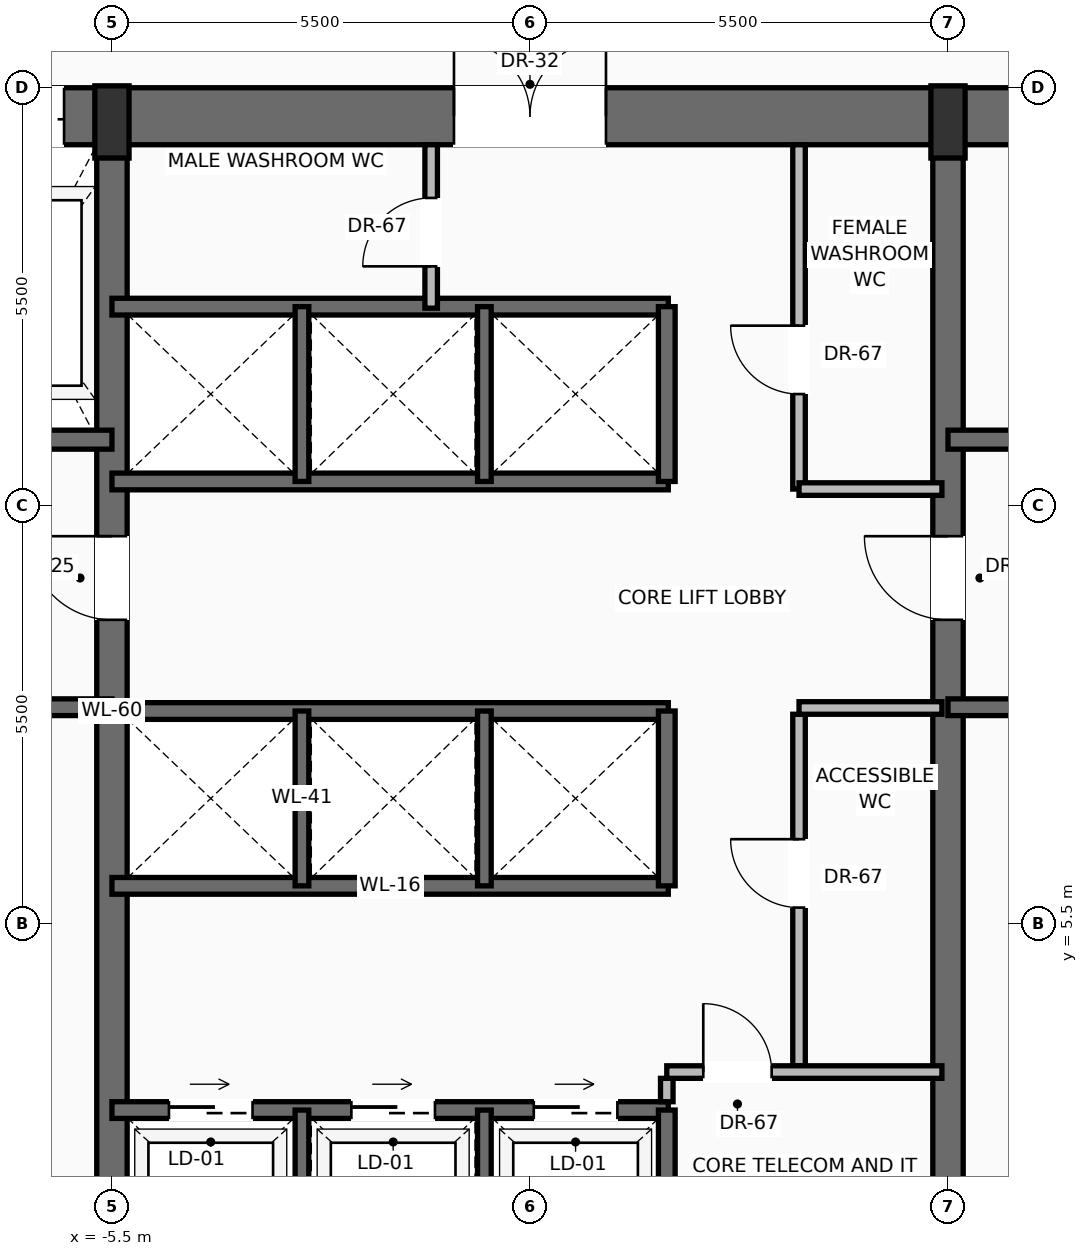
"""IFC4 building model, lengths in metres.
Left out: names, types, materials, properties, quantities, classifications, styles, units other than length and angle.
Written with IfcOpenShell. Run it as: python <this file> out.ifc"""

import sys

from ifc_helpers import new_model, si_unit, direction, frame, frame_2d, origin, origin_2d, place, context, subcontext, project, spatial, rectangle, extrude, source, transform, mapped, element, fill, save


model = new_model("IFC4")
c1 = context("Model", 3, precision=1e-05, world=origin(), true_north=direction((0.0, 1.0)))
c2 = subcontext(c1, "Body", "Model", "MODEL_VIEW")
j1 = project(units=[si_unit("LENGTHUNIT", "METRE"), si_unit("PLANEANGLEUNIT", "RADIAN")], contexts=[c1])
p1 = place(None, origin())
s1 = spatial("IfcSite", under=j1, at=p1, CompositionType="ELEMENT")
p2 = place(p1, origin())
s2 = spatial("IfcBuilding", under=s1, at=p2, CompositionType="ELEMENT")
p3 = place(p2, frame((0.0, 0.0, 91.4)))
s3 = spatial("IfcBuildingStorey", under=s2, at=p3, CompositionType="ELEMENT", Elevation=91.4)
p4 = place(p3, frame((-10.9, 16.125, 0.0), z_axis=(0.0, 0.0, 1.0), x_axis=(1.0, 0.0, 0.0)))
e1 = element("IfcWall", 1, at=p4, inside=s3, PredefinedType="SHEAR", context=c2, shape_type="SweptSolid", body=[
    extrude(rectangle(XDim=21.8, YDim=0.75, at=frame_2d((10.9, 0.0))), origin(), (0.0, 0.0, 1.0), 3.45),
])
p5 = place(p4, frame((3.47, 0.0, 0.0)))
e2 = element("IfcOpeningElement", 2, at=p5, cuts=e1, PredefinedType="OPENING", context=c2, shape_type="SweptSolid", body=[
    extrude(rectangle(XDim=1.3, YDim=2.3, at=frame_2d((0.65, 1.15))), frame((0.0, 0.385, 0.0), z_axis=(0.0, -1.0, 0.0), x_axis=(1.0, 0.0, 0.0)), (0.0, 0.0, 1.0), 0.77),
])
p6 = place(p4, frame((9.9, 0.0, 0.0)))
e3 = element("IfcOpeningElement", 3, at=p6, cuts=e1, PredefinedType="OPENING", context=c2, shape_type="SweptSolid", body=[
    extrude(rectangle(XDim=2.0, YDim=2.4, at=frame_2d((1.0, 1.2))), frame((0.0, 0.385, 0.0), z_axis=(0.0, -1.0, 0.0), x_axis=(1.0, 0.0, 0.0)), (0.0, 0.0, 1.0), 0.77),
])
p7 = place(p3, frame((-5.5, 0.475, 0.0), z_axis=(0.0, 0.0, 1.0), x_axis=(0.0, 1.0, 0.0)))
e4 = element("IfcWall", 4, at=p7, inside=s3, PredefinedType="SHEAR", context=c2, shape_type="SweptSolid", body=[
    extrude(rectangle(XDim=15.65, YDim=0.4, at=frame_2d((7.825, 0.0))), origin(), (0.0, 0.0, 1.0), 3.45),
])
p8 = place(p7, frame((9.025, 0.0, 0.0)))
e5 = element("IfcOpeningElement", 5, at=p8, cuts=e4, PredefinedType="OPENING", context=c2, shape_type="SweptSolid", body=[
    extrude(rectangle(XDim=1.1, YDim=2.2, at=frame_2d((0.55, 1.1))), frame((0.0, 0.21, 0.0), z_axis=(0.0, -1.0, 0.0), x_axis=(1.0, 0.0, 0.0)), (0.0, 0.0, 1.0), 0.42),
])
p9 = place(p3, frame((5.5, 0.475, 0.0), z_axis=(0.0, 0.0, 1.0), x_axis=(0.0, 1.0, 0.0)))
e6 = element("IfcWall", 6, at=p9, inside=s3, PredefinedType="SHEAR", context=c2, shape_type="SweptSolid", body=[
    extrude(rectangle(XDim=15.65, YDim=0.4, at=frame_2d((7.825, 0.0))), origin(), (0.0, 0.0, 1.0), 3.45),
])
p10 = place(p9, frame((9.025, 0.0, 0.0)))
e7 = element("IfcOpeningElement", 7, at=p10, cuts=e6, PredefinedType="OPENING", context=c2, shape_type="SweptSolid", body=[
    extrude(rectangle(XDim=1.1, YDim=2.2, at=frame_2d((0.55, 1.1))), frame((0.0, 0.21, 0.0), z_axis=(0.0, -1.0, 0.0), x_axis=(1.0, 0.0, 0.0)), (0.0, 0.0, 1.0), 0.42),
])
m1 = source(origin(), c2, "Body", "SweptSolid", [
    extrude(rectangle(XDim=0.45, YDim=0.95, at=origin_2d()), origin(), (0.0, 0.0, 1.0), 3.7),
])
for number, where, z_axis, x_axis in (
    (8, (-5.5, 16.05, 0.0), (0.0, 0.0, 1.0), (1.0, 0.0, 0.0)),
    (9, (5.5, 16.05, 0.0), (0.0, 0.0, 1.0), (1.0, 0.0, 0.0)),
):
    element("IfcColumn", number, at=place(p3, frame(where, z_axis=z_axis, x_axis=x_axis)), inside=s3, PredefinedType="PILASTER", context=c2, shape_type="MappedRepresentation", body=[
        mapped(m1, transform((0.0, 0.0, 0.0), scale=1.0)),
    ])
p11 = place(p3, frame((-5.5, 8.35, 0.0), z_axis=(0.0, 0.0, 1.0), x_axis=(-1.0, 0.0, 0.0)))
e10 = element("IfcWall", 10, at=p11, inside=s3, PredefinedType="SOLIDWALL", context=c2, shape_type="SweptSolid", body=[
    extrude(rectangle(XDim=4.65, YDim=0.22, at=frame_2d((2.325, 0.0))), origin(), (0.0, 0.0, 1.0), 3.45),
])
p12 = place(p11, frame((2.5, 0.0, 0.0)))
e11 = element("IfcOpeningElement", 11, at=p12, cuts=e10, PredefinedType="OPENING", context=c2, shape_type="SweptSolid", body=[
    extrude(rectangle(XDim=1.15, YDim=2.2, at=frame_2d((0.575, 1.1))), frame((0.0, 0.12, 0.0), z_axis=(0.0, -1.0, 0.0), x_axis=(1.0, 0.0, 0.0)), (0.0, 0.0, 1.0), 0.24),
])
p13 = place(p3, frame((-5.5, 11.87, 0.0), z_axis=(0.0, 0.0, 1.0), x_axis=(-1.0, 0.0, 0.0)))
e12 = element("IfcWall", 12, at=p13, inside=s3, PredefinedType="SOLIDWALL", context=c2, shape_type="SweptSolid", body=[
    extrude(rectangle(XDim=4.65, YDim=0.25, at=frame_2d((2.325, 0.0))), origin(), (0.0, 0.0, 1.0), 3.45),
])
p14 = place(p13, frame((2.95, 0.0, 0.0)))
e13 = element("IfcOpeningElement", 13, at=p14, cuts=e12, PredefinedType="OPENING", context=c2, shape_type="SweptSolid", body=[
    extrude(rectangle(XDim=1.2, YDim=2.25, at=frame_2d((0.6, 1.125))), frame((0.0, 0.135, 0.0), z_axis=(0.0, -1.0, 0.0), x_axis=(1.0, 0.0, 0.0)), (0.0, 0.0, 1.0), 0.27),
])
p15 = place(p3, frame((10.15, 8.35, 0.0), z_axis=(0.0, 0.0, 1.0), x_axis=(-1.0, 0.0, 0.0)))
e14 = element("IfcWall", 14, at=p15, inside=s3, PredefinedType="SOLIDWALL", context=c2, shape_type="SweptSolid", body=[
    extrude(rectangle(XDim=4.65, YDim=0.22, at=frame_2d((2.325, 0.0))), origin(), (0.0, 0.0, 1.0), 3.45),
])
p16 = place(p15, frame((1.0, 0.0, 0.0)))
e15 = element("IfcOpeningElement", 15, at=p16, cuts=e14, PredefinedType="OPENING", context=c2, shape_type="SweptSolid", body=[
    extrude(rectangle(XDim=1.15, YDim=2.2, at=frame_2d((0.575, 1.1))), frame((0.0, 0.12, 0.0), z_axis=(0.0, -1.0, 0.0), x_axis=(1.0, 0.0, 0.0)), (0.0, 0.0, 1.0), 0.24),
])
p17 = place(p3, frame((10.15, 11.87, 0.0), z_axis=(0.0, 0.0, 1.0), x_axis=(-1.0, 0.0, 0.0)))
e16 = element("IfcWall", 16, at=p17, inside=s3, PredefinedType="SOLIDWALL", context=c2, shape_type="SweptSolid", body=[
    extrude(rectangle(XDim=4.65, YDim=0.25, at=frame_2d((2.325, 0.0))), origin(), (0.0, 0.0, 1.0), 3.45),
])
p18 = place(p17, frame((0.5, 0.0, 0.0)))
e17 = element("IfcOpeningElement", 17, at=p18, cuts=e16, PredefinedType="OPENING", context=c2, shape_type="SweptSolid", body=[
    extrude(rectangle(XDim=1.2, YDim=2.25, at=frame_2d((0.6, 1.125))), frame((0.0, 0.135, 0.0), z_axis=(0.0, -1.0, 0.0), x_axis=(1.0, 0.0, 0.0)), (0.0, 0.0, 1.0), 0.27),
])
p19 = place(p3, frame((-5.5, 3.05, 0.0), z_axis=(0.0, 0.0, 1.0), x_axis=(1.0, 0.0, 0.0)))
e18 = element("IfcWall", 18, at=p19, inside=s3, PredefinedType="SOLIDWALL", context=c2, shape_type="SweptSolid", body=[
    extrude(rectangle(XDim=7.32, YDim=0.22, at=frame_2d((3.66, 0.0))), origin(), (0.0, 0.0, 1.0), 3.45),
])
p20 = place(p19, frame((0.75, 0.0, 0.0)))
e19 = element("IfcOpeningElement", 19, at=p20, cuts=e18, PredefinedType="OPENING", context=c2, shape_type="SweptSolid", body=[
    extrude(rectangle(XDim=1.1, YDim=2.2, at=frame_2d((0.55, 1.1))), frame((0.0, 0.12, 0.0), z_axis=(0.0, -1.0, 0.0), x_axis=(1.0, 0.0, 0.0)), (0.0, 0.0, 1.0), 0.24),
])
p21 = place(p19, frame((3.15, 0.0, 0.0)))
e20 = element("IfcOpeningElement", 20, at=p21, cuts=e18, PredefinedType="OPENING", context=c2, shape_type="SweptSolid", body=[
    extrude(rectangle(XDim=1.1, YDim=2.2, at=frame_2d((0.55, 1.1))), frame((0.0, 0.12, 0.0), z_axis=(0.0, -1.0, 0.0), x_axis=(1.0, 0.0, 0.0)), (0.0, 0.0, 1.0), 0.24),
])
p22 = place(p19, frame((5.55, 0.0, 0.0)))
e21 = element("IfcOpeningElement", 21, at=p22, cuts=e18, PredefinedType="OPENING", context=c2, shape_type="SweptSolid", body=[
    extrude(rectangle(XDim=1.1, YDim=2.2, at=frame_2d((0.55, 1.1))), frame((0.0, 0.12, 0.0), z_axis=(0.0, -1.0, 0.0), x_axis=(1.0, 0.0, 0.0)), (0.0, 0.0, 1.0), 0.24),
])
p23 = place(p3, frame((1.8, 0.85, 0.0), z_axis=(0.0, 0.0, 1.0), x_axis=(0.0, 1.0, 0.0)))
e22 = element("IfcWall", 22, at=p23, inside=s3, PredefinedType="SOLIDWALL", context=c2, shape_type="SweptSolid", body=[
    extrude(rectangle(XDim=2.2, YDim=0.22, at=frame_2d((1.1, 0.0))), origin(), (0.0, 0.0, 1.0), 3.45),
])
for number, where, z_axis, x_axis in (
    (23, (-3.0, 0.85, 0.0), (0.0, 0.0, 1.0), (0.0, 1.0, 0.0)),
    (24, (-0.6, 0.85, 0.0), (0.0, 0.0, 1.0), (0.0, 1.0, 0.0)),
):
    element("IfcWall", number, at=place(p3, frame(where, z_axis=z_axis, x_axis=x_axis)), inside=s3, PredefinedType="SOLIDWALL", context=c2, shape_type="SweptSolid", body=[
        extrude(rectangle(XDim=2.2, YDim=0.18, at=frame_2d((1.1, 0.0))), origin(), (0.0, 0.0, 1.0), 3.45),
    ])
p24 = place(p3, frame((1.8, 3.16, 0.0), z_axis=(0.0, 0.0, 1.0), x_axis=(0.0, 1.0, 0.0)))
e25 = element("IfcWall", 25, at=p24, inside=s3, PredefinedType="PARTITIONING", context=c2, shape_type="SweptSolid", body=[
    extrude(rectangle(XDim=0.308, YDim=0.165, at=frame_2d((0.154, 0.0))), origin(), (0.0, 0.0, 1.0), 3.442),
])
p25 = place(p3, frame((3.54, 3.633, 0.0), z_axis=(0.0, 0.0, 1.0), x_axis=(0.0, 1.0, 0.0)))
e26 = element("IfcWall", 26, at=p25, inside=s3, PredefinedType="PARTITIONING", context=c2, shape_type="SweptSolid", body=[
    extrude(rectangle(XDim=4.625, YDim=0.165, at=frame_2d((2.312, 0.0))), origin(), (0.0, 0.0, 1.0), 3.442),
])
p26 = place(p25, frame((2.081, 0.0, 0.0)))
e27 = element("IfcOpeningElement", 27, at=p26, cuts=e26, PredefinedType="OPENING", context=c2, shape_type="SweptSolid", body=[
    extrude(rectangle(XDim=0.9, YDim=2.1, at=frame_2d((0.45, 1.05))), frame((0.0, 0.093, 0.0), z_axis=(0.0, -1.0, 0.0), x_axis=(1.0, 0.0, 0.0)), (0.0, 0.0, 1.0), 0.185),
])
p27 = place(p3, frame((3.54, 8.34, 0.0), z_axis=(0.0, 0.0, 1.0), x_axis=(1.0, 0.0, 0.0)))
e28 = element("IfcWall", 28, at=p27, inside=s3, PredefinedType="PARTITIONING", context=c2, shape_type="SweptSolid", body=[
    extrude(rectangle(XDim=1.88, YDim=0.165, at=frame_2d((0.94, 0.0))), origin(), (0.0, 0.0, 1.0), 3.442),
])
p28 = place(p3, frame((1.8, 3.55, 0.0), z_axis=(0.0, 0.0, 1.0), x_axis=(1.0, 0.0, 0.0)))
e29 = element("IfcWall", 29, at=p28, inside=s3, PredefinedType="PARTITIONING", context=c2, shape_type="SweptSolid", body=[
    extrude(rectangle(XDim=3.62, YDim=0.165, at=frame_2d((1.81, 0.0))), origin(), (0.0, 0.0, 1.0), 3.442),
])
p29 = place(p28, frame((0.48, 0.0, 0.0)))
e30 = element("IfcOpeningElement", 30, at=p29, cuts=e29, PredefinedType="OPENING", context=c2, shape_type="SweptSolid", body=[
    extrude(rectangle(XDim=0.9, YDim=2.1, at=frame_2d((0.45, 1.05))), frame((0.0, 0.093, 0.0), z_axis=(0.0, -1.0, 0.0), x_axis=(1.0, 0.0, 0.0)), (0.0, 0.0, 1.0), 0.185),
])
for number, where, z_axis, x_axis in (
    (31, (-5.5, 6.0, 0.0), (0.0, 0.0, 1.0), (1.0, 0.0, 0.0)),
    (32, (-5.5, 8.3, 0.0), (0.0, 0.0, 1.0), (1.0, 0.0, 0.0)),
):
    element("IfcWall", number, at=place(p3, frame(where, z_axis=z_axis, x_axis=x_axis)), inside=s3, PredefinedType="SOLIDWALL", context=c2, shape_type="SweptSolid", body=[
        extrude(rectangle(XDim=7.32, YDim=0.22, at=frame_2d((3.66, 0.0))), origin(), (0.0, 0.0, 1.0), 3.45),
    ])
p30 = place(p3, frame((1.8, 6.0, 0.0), z_axis=(0.0, 0.0, 1.0), x_axis=(0.0, 1.0, 0.0)))
e33 = element("IfcWall", 33, at=p30, inside=s3, PredefinedType="SOLIDWALL", context=c2, shape_type="SweptSolid", body=[
    extrude(rectangle(XDim=2.3, YDim=0.22, at=frame_2d((1.15, 0.0))), origin(), (0.0, 0.0, 1.0), 3.45),
])
for number, where, z_axis, x_axis in (
    (34, (-3.0, 6.0, 0.0), (0.0, 0.0, 1.0), (0.0, 1.0, 0.0)),
    (35, (-0.6, 6.0, 0.0), (0.0, 0.0, 1.0), (0.0, 1.0, 0.0)),
):
    element("IfcWall", number, at=place(p3, frame(where, z_axis=z_axis, x_axis=x_axis)), inside=s3, PredefinedType="SOLIDWALL", context=c2, shape_type="SweptSolid", body=[
        extrude(rectangle(XDim=2.3, YDim=0.18, at=frame_2d((1.15, 0.0))), origin(), (0.0, 0.0, 1.0), 3.45),
    ])
for number, where, z_axis, x_axis in (
    (36, (-5.5, 11.32, 0.0), (0.0, 0.0, 1.0), (1.0, 0.0, 0.0)),
    (37, (-5.5, 13.62, 0.0), (0.0, 0.0, 1.0), (1.0, 0.0, 0.0)),
):
    element("IfcWall", number, at=place(p3, frame(where, z_axis=z_axis, x_axis=x_axis)), inside=s3, PredefinedType="SOLIDWALL", context=c2, shape_type="SweptSolid", body=[
        extrude(rectangle(XDim=7.32, YDim=0.22, at=frame_2d((3.66, 0.0))), origin(), (0.0, 0.0, 1.0), 3.45),
    ])
p31 = place(p3, frame((1.8, 11.32, 0.0), z_axis=(0.0, 0.0, 1.0), x_axis=(0.0, 1.0, 0.0)))
e38 = element("IfcWall", 38, at=p31, inside=s3, PredefinedType="SOLIDWALL", context=c2, shape_type="SweptSolid", body=[
    extrude(rectangle(XDim=2.3, YDim=0.22, at=frame_2d((1.15, 0.0))), origin(), (0.0, 0.0, 1.0), 3.45),
])
for number, where, z_axis, x_axis in (
    (39, (-3.0, 11.32, 0.0), (0.0, 0.0, 1.0), (0.0, 1.0, 0.0)),
    (40, (-0.6, 11.32, 0.0), (0.0, 0.0, 1.0), (0.0, 1.0, 0.0)),
):
    element("IfcWall", number, at=place(p3, frame(where, z_axis=z_axis, x_axis=x_axis)), inside=s3, PredefinedType="SOLIDWALL", context=c2, shape_type="SweptSolid", body=[
        extrude(rectangle(XDim=2.3, YDim=0.18, at=frame_2d((1.15, 0.0))), origin(), (0.0, 0.0, 1.0), 3.45),
    ])
p32 = place(p3, frame((-1.3, 13.6, 0.0), z_axis=(0.0, 0.0, 1.0), x_axis=(0.0, 1.0, 0.0)))
e41 = element("IfcWall", 41, at=p32, inside=s3, PredefinedType="PARTITIONING", context=c2, shape_type="SweptSolid", body=[
    extrude(rectangle(XDim=2.15, YDim=0.165, at=frame_2d((1.075, 0.0))), origin(), (0.0, 0.0, 1.0), 3.442),
])
p33 = place(p32, frame((0.55, 0.0, 0.0)))
e42 = element("IfcOpeningElement", 42, at=p33, cuts=e41, PredefinedType="OPENING", context=c2, shape_type="SweptSolid", body=[
    extrude(rectangle(XDim=0.9, YDim=2.1, at=frame_2d((0.45, 1.05))), frame((0.0, 0.093, 0.0), z_axis=(0.0, -1.0, 0.0), x_axis=(1.0, 0.0, 0.0)), (0.0, 0.0, 1.0), 0.185),
])
p34 = place(p3, frame((3.54, 11.22, 0.0), z_axis=(0.0, 0.0, 1.0), x_axis=(0.0, 1.0, 0.0)))
e43 = element("IfcWall", 43, at=p34, inside=s3, PredefinedType="PARTITIONING", context=c2, shape_type="SweptSolid", body=[
    extrude(rectangle(XDim=4.53, YDim=0.165, at=frame_2d((2.265, 0.0))), origin(), (0.0, 0.0, 1.0), 3.442),
])
p35 = place(p34, frame((1.25, 0.0, 0.0)))
e44 = element("IfcOpeningElement", 44, at=p35, cuts=e43, PredefinedType="OPENING", context=c2, shape_type="SweptSolid", body=[
    extrude(rectangle(XDim=0.9, YDim=2.1, at=frame_2d((0.45, 1.05))), frame((0.0, 0.093, 0.0), z_axis=(0.0, -1.0, 0.0), x_axis=(1.0, 0.0, 0.0)), (0.0, 0.0, 1.0), 0.185),
])
p36 = place(p3, frame((3.54, 11.22, 0.0), z_axis=(0.0, 0.0, 1.0), x_axis=(1.0, 0.0, 0.0)))
e45 = element("IfcWall", 45, at=p36, inside=s3, PredefinedType="PARTITIONING", context=c2, shape_type="SweptSolid", body=[
    extrude(rectangle(XDim=1.88, YDim=0.165, at=frame_2d((0.94, 0.0))), origin(), (0.0, 0.0, 1.0), 3.442),
])
m2 = source(origin(), c2, "Body", "SweptSolid", [
    extrude(rectangle(XDim=1.1, YDim=2.2, at=frame_2d((0.55, 1.1))), frame((0.0, 0.025, 0.0), z_axis=(0.0, -1.0, 0.0), x_axis=(1.0, 0.0, 0.0)), (0.0, 0.0, 1.0), 0.05),
])
p37 = place(p8, origin())
e46 = element("IfcDoor", 46, at=p37, inside=s3, OperationType="SINGLE_SWING_RIGHT", PredefinedType="DOOR", context=c2, shape_type="MappedRepresentation", body=[
    mapped(m2, transform((0.0, 0.0, 0.0), scale=1.0)),
])
fill(e5, e46)
m3 = source(origin(), c2, "Body", "SweptSolid", [
    extrude(rectangle(XDim=1.3, YDim=2.3, at=frame_2d((0.65, 1.15))), frame((0.0, 0.025, 0.0), z_axis=(0.0, -1.0, 0.0), x_axis=(1.0, 0.0, 0.0)), (0.0, 0.0, 1.0), 0.05),
])
p38 = place(p5, origin())
e47 = element("IfcDoor", 47, at=p38, inside=s3, OperationType="SLIDING_TO_RIGHT", PredefinedType="DOOR", context=c2, shape_type="MappedRepresentation", body=[
    mapped(m3, transform((0.0, 0.0, 0.0), scale=1.0)),
])
fill(e2, e47)
p39 = place(p10, origin())
e48 = element("IfcDoor", 48, at=p39, inside=s3, OperationType="SINGLE_SWING_RIGHT", PredefinedType="DOOR", context=c2, shape_type="MappedRepresentation", body=[
    mapped(m2, transform((0.0, 0.0, 0.0), scale=1.0)),
])
fill(e7, e48)
m4 = source(origin(), c2, "Body", "SweptSolid", [
    extrude(rectangle(XDim=2.0, YDim=2.4, at=frame_2d((1.0, 1.2))), frame((0.0, 0.025, 0.0), z_axis=(0.0, -1.0, 0.0), x_axis=(1.0, 0.0, 0.0)), (0.0, 0.0, 1.0), 0.05),
])
p40 = place(p6, origin())
e49 = element("IfcDoor", 49, at=p40, inside=s3, OperationType="DOUBLE_DOOR_SINGLE_SWING", PredefinedType="DOOR", context=c2, shape_type="MappedRepresentation", body=[
    mapped(m4, transform((0.0, 0.0, 0.0), scale=1.0)),
])
fill(e3, e49)
m5 = source(origin(), c2, "Body", "SweptSolid", [
    extrude(rectangle(XDim=1.1, YDim=2.2, at=frame_2d((0.55, 1.1))), frame((0.0, 0.025, 0.0), z_axis=(0.0, -1.0, 0.0), x_axis=(1.0, 0.0, 0.0)), (0.0, 0.0, 1.0), 0.05),
])
p41 = place(p20, origin())
e50 = element("IfcDoor", 50, at=p41, inside=s3, OperationType="SLIDING_TO_RIGHT", PredefinedType="DOOR", context=c2, shape_type="MappedRepresentation", body=[
    mapped(m5, transform((0.0, 0.0, 0.0), scale=1.0)),
])
fill(e19, e50)
p42 = place(p21, origin())
e51 = element("IfcDoor", 51, at=p42, inside=s3, OperationType="SLIDING_TO_RIGHT", PredefinedType="DOOR", context=c2, shape_type="MappedRepresentation", body=[
    mapped(m5, transform((0.0, 0.0, 0.0), scale=1.0)),
])
fill(e20, e51)
p43 = place(p22, origin())
e52 = element("IfcDoor", 52, at=p43, inside=s3, OperationType="SLIDING_TO_RIGHT", PredefinedType="DOOR", context=c2, shape_type="MappedRepresentation", body=[
    mapped(m5, transform((0.0, 0.0, 0.0), scale=1.0)),
])
fill(e21, e52)
m6 = source(origin(), c2, "Body", "SweptSolid", [
    extrude(rectangle(XDim=0.9, YDim=2.1, at=frame_2d((0.45, 1.05))), frame((0.0, 0.025, 0.0), z_axis=(0.0, -1.0, 0.0), x_axis=(1.0, 0.0, 0.0)), (0.0, 0.0, 1.0), 0.05),
])
p44 = place(p29, origin())
e53 = element("IfcDoor", 53, at=p44, inside=s3, OperationType="SINGLE_SWING_LEFT", PredefinedType="DOOR", context=c2, shape_type="MappedRepresentation", body=[
    mapped(m6, transform((0.0, 0.0, 0.0), scale=1.0)),
])
fill(e30, e53)
p45 = place(p26, origin())
e54 = element("IfcDoor", 54, at=p45, inside=s3, OperationType="SINGLE_SWING_RIGHT", PredefinedType="DOOR", context=c2, shape_type="MappedRepresentation", body=[
    mapped(m6, transform((0.0, 0.0, 0.0), scale=1.0)),
])
fill(e27, e54)
p46 = place(p33, origin())
e55 = element("IfcDoor", 55, at=p46, inside=s3, OperationType="SINGLE_SWING_LEFT", PredefinedType="DOOR", context=c2, shape_type="MappedRepresentation", body=[
    mapped(m6, transform((0.0, 0.0, 0.0), scale=1.0)),
])
fill(e42, e55)
p47 = place(p35, origin())
e56 = element("IfcDoor", 56, at=p47, inside=s3, OperationType="SINGLE_SWING_RIGHT", PredefinedType="DOOR", context=c2, shape_type="MappedRepresentation", body=[
    mapped(m6, transform((0.0, 0.0, 0.0), scale=1.0)),
])
fill(e44, e56)
save(model, sys.argv[1])
